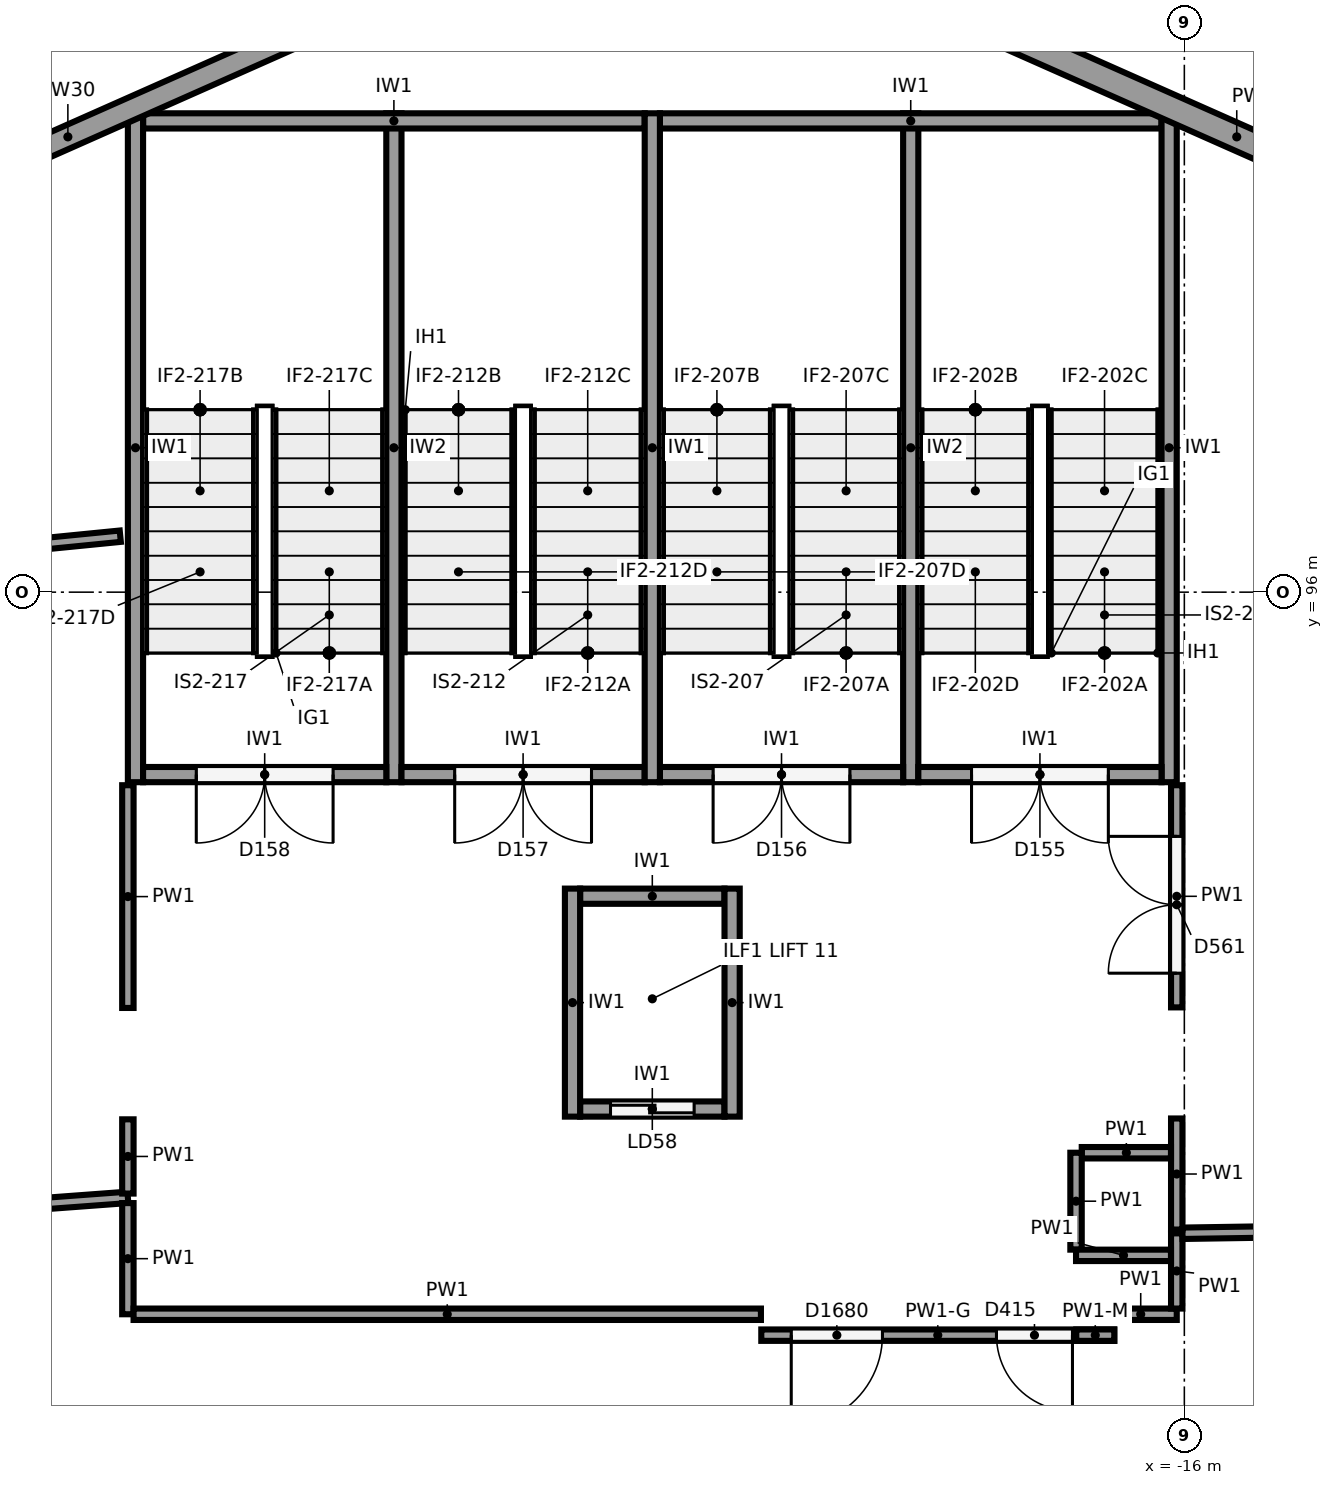
"""IFC4 building model, lengths in metres.
Left out: names, types, materials, properties, quantities, classifications, styles, units other than length and angle.
Written with IfcOpenShell. Run it as: python <this file> out.ifc"""

import sys

from ifc_helpers import new_model, si_unit, direction, frame, frame_2d, origin, origin_2d, place, context, subcontext, project, spatial, rectangle, circle, extrude, element, fill, save


model = new_model("IFC4")
c1 = context("Model", 3, precision=1e-05, world=origin(), true_north=direction((0.0, 1.0)))
c2 = subcontext(c1, "Body", "Model", "MODEL_VIEW")
j1 = project(units=[si_unit("LENGTHUNIT", "METRE"), si_unit("PLANEANGLEUNIT", "RADIAN")], contexts=[c1])
p1 = place(None, origin())
s1 = spatial("IfcSite", under=j1, at=p1, CompositionType="ELEMENT")
p2 = place(p1, origin())
s2 = spatial("IfcBuilding", under=s1, at=p2, CompositionType="ELEMENT")
p3 = place(p2, origin())
s3 = spatial("IfcBuildingStorey", under=s2, at=p3, CompositionType="ELEMENT", Elevation=0.0)
p4 = place(p3, frame((-19.119, 85.698, 0.0), z_axis=(0.0, 0.0, 1.0), x_axis=(1.0, 0.0, 0.0)))
e1 = element("IfcColumn", 1, at=p4, inside=s3, PredefinedType="COLUMN", context=c2, shape_type="SweptSolid", body=[
    extrude(circle(Radius=0.4, at=origin_2d()), origin(), (0.0, 0.0, 1.0), 6.5),
])
p5 = place(p3, frame((-19.627, 89.904, 0.0), z_axis=(0.0, 0.0, 1.0), x_axis=(1.0, 0.0, 0.0)))
e2 = element("IfcColumn", 2, at=p5, inside=s3, PredefinedType="COLUMN", context=c2, shape_type="SweptSolid", body=[
    extrude(circle(Radius=0.55, at=origin_2d()), origin(), (0.0, 0.0, 1.0), 6.5),
])
p6 = place(p3, frame((-22.543, 105.198, 0.0), z_axis=(0.0, 0.0, 1.0), x_axis=(0.914138897099, -0.405401130748, 0.0)))
e3 = element("IfcWall", 3, at=p6, inside=s3, PredefinedType="SOLIDWALL", context=c2, shape_type="SweptSolid", body=[
    extrude(rectangle(XDim=15.824, YDim=0.35, at=frame_2d((7.912, 0.0))), origin(), (0.0, 0.0, 1.0), 4.85),
])
p7 = place(p3, frame((-37.922, 98.782, 0.0), z_axis=(0.0, 0.0, 1.0), x_axis=(0.914138897099, 0.405401130748, 0.0)))
e4 = element("IfcWall", 4, at=p7, inside=s3, PredefinedType="SOLIDWALL", context=c2, shape_type="SweptSolid", body=[
    extrude(rectangle(XDim=15.824, YDim=0.3, at=frame_2d((7.912, 0.0))), origin(), (0.0, 0.0, 1.0), 4.85),
])
for number, where, z_axis, x_axis in (
    (5, (-16.2, 102.3, 0.0), (0.0, 0.0, 1.0), (0.0, -1.0, 0.0)),
    (6, (-23.0, 102.3, 0.0), (0.0, 0.0, 1.0), (0.0, -1.0, 0.0)),
    (7, (-29.8, 102.3, 0.0), (0.0, 0.0, 1.0), (0.0, -1.0, 0.0)),
):
    element("IfcWall", number, at=place(p3, frame(where, z_axis=z_axis, x_axis=x_axis)), inside=s3, PredefinedType="SHEAR", context=c2, shape_type="SweptSolid", body=[
        extrude(rectangle(XDim=8.8, YDim=0.2, at=frame_2d((4.4, 0.0))), origin(), (0.0, 0.0, 1.0), 6.15),
    ])
for number, where, z_axis, x_axis in (
    (8, (-16.3, 102.2, 0.0), (0.0, 0.0, 1.0), (-1.0, 0.0, 0.0)),
    (9, (-23.1, 102.2, 0.0), (0.0, 0.0, 1.0), (-1.0, 0.0, 0.0)),
):
    element("IfcWall", number, at=place(p3, frame(where, z_axis=z_axis, x_axis=x_axis)), inside=s3, PredefinedType="SHEAR", context=c2, shape_type="SweptSolid", body=[
        extrude(rectangle(XDim=6.6, YDim=0.2, at=frame_2d((3.3, 0.0))), origin(), (0.0, 0.0, 1.0), 6.15),
    ])
for number, where, z_axis, x_axis in (
    (10, (-19.6, 102.3, 0.0), (0.0, 0.0, 1.0), (0.0, -1.0, 0.0)),
    (11, (-26.4, 102.3, 0.0), (0.0, 0.0, 1.0), (0.0, -1.0, 0.0)),
):
    element("IfcWall", number, at=place(p3, frame(where, z_axis=z_axis, x_axis=x_axis)), inside=s3, PredefinedType="SHEAR", context=c2, shape_type="SweptSolid", body=[
        extrude(rectangle(XDim=8.8, YDim=0.2, at=frame_2d((4.4, 0.0))), origin(), (0.0, 0.0, 1.0), 6.15),
    ])
p8 = place(p3, frame((-16.3, 93.6, 0.0), z_axis=(0.0, 0.0, 1.0), x_axis=(-1.0, 0.0, 0.0)))
e12 = element("IfcWall", 12, at=p8, inside=s3, PredefinedType="SHEAR", context=c2, shape_type="SweptSolid", body=[
    extrude(rectangle(XDim=3.2, YDim=0.2, at=frame_2d((1.6, 0.0))), origin(), (0.0, 0.0, 1.0), 6.15),
])
p9 = place(p8, frame((0.7, 0.0, 0.0)))
e13 = element("IfcOpeningElement", 13, at=p9, cuts=e12, PredefinedType="OPENING", context=c2, shape_type="SweptSolid", body=[
    extrude(rectangle(XDim=1.8, YDim=2.1, at=frame_2d((0.9, 1.05))), frame((0.0, 0.11, 0.0), z_axis=(0.0, -1.0, 0.0), x_axis=(1.0, 0.0, 0.0)), (0.0, 0.0, 1.0), 0.22),
])
p10 = place(p3, frame((-19.7, 93.6, 0.0), z_axis=(0.0, 0.0, 1.0), x_axis=(-1.0, 0.0, 0.0)))
e14 = element("IfcWall", 14, at=p10, inside=s3, PredefinedType="SHEAR", context=c2, shape_type="SweptSolid", body=[
    extrude(rectangle(XDim=3.2, YDim=0.2, at=frame_2d((1.6, 0.0))), origin(), (0.0, 0.0, 1.0), 6.15),
])
p11 = place(p10, frame((0.7, 0.0, 0.0)))
e15 = element("IfcOpeningElement", 15, at=p11, cuts=e14, PredefinedType="OPENING", context=c2, shape_type="SweptSolid", body=[
    extrude(rectangle(XDim=1.8, YDim=2.1, at=frame_2d((0.9, 1.05))), frame((0.0, 0.11, 0.0), z_axis=(0.0, -1.0, 0.0), x_axis=(1.0, 0.0, 0.0)), (0.0, 0.0, 1.0), 0.22),
])
p12 = place(p3, frame((-23.1, 93.6, 0.0), z_axis=(0.0, 0.0, 1.0), x_axis=(-1.0, 0.0, 0.0)))
e16 = element("IfcWall", 16, at=p12, inside=s3, PredefinedType="SHEAR", context=c2, shape_type="SweptSolid", body=[
    extrude(rectangle(XDim=3.2, YDim=0.2, at=frame_2d((1.6, 0.0))), origin(), (0.0, 0.0, 1.0), 6.15),
])
p13 = place(p12, frame((0.7, 0.0, 0.0)))
e17 = element("IfcOpeningElement", 17, at=p13, cuts=e16, PredefinedType="OPENING", context=c2, shape_type="SweptSolid", body=[
    extrude(rectangle(XDim=1.8, YDim=2.1, at=frame_2d((0.9, 1.05))), frame((0.0, 0.11, 0.0), z_axis=(0.0, -1.0, 0.0), x_axis=(1.0, 0.0, 0.0)), (0.0, 0.0, 1.0), 0.22),
])
p14 = place(p3, frame((-26.5, 93.6, 0.0), z_axis=(0.0, 0.0, 1.0), x_axis=(-1.0, 0.0, 0.0)))
e18 = element("IfcWall", 18, at=p14, inside=s3, PredefinedType="SHEAR", context=c2, shape_type="SweptSolid", body=[
    extrude(rectangle(XDim=3.2, YDim=0.2, at=frame_2d((1.6, 0.0))), origin(), (0.0, 0.0, 1.0), 6.15),
])
p15 = place(p14, frame((0.7, 0.0, 0.0)))
e19 = element("IfcOpeningElement", 19, at=p15, cuts=e18, PredefinedType="OPENING", context=c2, shape_type="SweptSolid", body=[
    extrude(rectangle(XDim=1.8, YDim=2.1, at=frame_2d((0.9, 1.05))), frame((0.0, 0.11, 0.0), z_axis=(0.0, -1.0, 0.0), x_axis=(1.0, 0.0, 0.0)), (0.0, 0.0, 1.0), 0.22),
])
for number, where, z_axis, x_axis in (
    (20, (-21.95, 92.1, 0.0), (0.0, 0.0, 1.0), (0.0, -1.0, 0.0)),
    (21, (-24.05, 92.1, 0.0), (0.0, 0.0, 1.0), (0.0, -1.0, 0.0)),
):
    element("IfcWall", number, at=place(p3, frame(where, z_axis=z_axis, x_axis=x_axis)), inside=s3, PredefinedType="SHEAR", context=c2, shape_type="SweptSolid", body=[
        extrude(rectangle(XDim=3.0, YDim=0.2, at=frame_2d((1.5, 0.0))), origin(), (0.0, 0.0, 1.0), 6.15),
    ])
p16 = place(p3, frame((-22.05, 92.0, 0.0), z_axis=(0.0, 0.0, 1.0), x_axis=(-1.0, 0.0, 0.0)))
e22 = element("IfcWall", 22, at=p16, inside=s3, PredefinedType="SHEAR", context=c2, shape_type="SweptSolid", body=[
    extrude(rectangle(XDim=1.9, YDim=0.2, at=frame_2d((0.95, 0.0))), origin(), (0.0, 0.0, 1.0), 6.15),
])
p17 = place(p3, frame((-22.05, 89.2, 0.0), z_axis=(0.0, 0.0, 1.0), x_axis=(-1.0, 0.0, 0.0)))
e23 = element("IfcWall", 23, at=p17, inside=s3, PredefinedType="SHEAR", context=c2, shape_type="SweptSolid", body=[
    extrude(rectangle(XDim=1.9, YDim=0.2, at=frame_2d((0.95, 0.0))), origin(), (0.0, 0.0, 1.0), 6.15),
])
p18 = place(p17, frame((0.4, 0.0, 0.0)))
e24 = element("IfcOpeningElement", 24, at=p18, cuts=e23, PredefinedType="OPENING", context=c2, shape_type="SweptSolid", body=[
    extrude(rectangle(XDim=1.1, YDim=2.1, at=frame_2d((0.55, 1.05))), frame((0.0, 0.11, 0.0), z_axis=(0.0, -1.0, 0.0), x_axis=(1.0, 0.0, 0.0)), (0.0, 0.0, 1.0), 0.22),
])
p19 = place(p3, frame((-17.048, 86.5, 0.0), z_axis=(0.0, 0.0, 1.0), x_axis=(1.0, 0.0, 0.0)))
e25 = element("IfcWall", 25, at=p19, inside=s3, PredefinedType="PARTITIONING", context=c2, shape_type="SweptSolid", body=[
    extrude(rectangle(XDim=0.948, YDim=0.15, at=frame_2d((0.474, 0.0))), origin(), (0.0, 0.0, 1.0), 6.15),
])
p20 = place(p3, frame((-16.1, 86.575, 0.0), z_axis=(0.0, 0.0, 1.0), x_axis=(0.0, 1.0, 0.0)))
e26 = element("IfcWall", 26, at=p20, inside=s3, PredefinedType="PARTITIONING", context=c2, shape_type="SweptSolid", body=[
    extrude(rectangle(XDim=0.989, YDim=0.15, at=frame_2d((0.495, 0.0))), origin(), (0.0, 0.0, 1.0), 6.15),
])
p21 = place(p3, frame((-16.025, 87.565, 0.0), z_axis=(0.0, 0.0, 1.0), x_axis=(0.999882927084, 0.015301376583, 0.0)))
e27 = element("IfcWall", 27, at=p21, inside=s3, PredefinedType="PARTITIONING", context=c2, shape_type="SweptSolid", body=[
    extrude(rectangle(XDim=8.855, YDim=0.15, at=frame_2d((4.428, 0.0))), origin(), (0.0, 0.0, 1.0), 6.15),
])
p22 = place(p3, frame((-16.1, 87.614, 0.0), z_axis=(0.0, 0.0, 1.0), x_axis=(0.0, 1.0, 0.0)))
e28 = element("IfcWall", 28, at=p22, inside=s3, PredefinedType="PARTITIONING", context=c2, shape_type="SweptSolid", body=[
    extrude(rectangle(XDim=1.461, YDim=0.15, at=frame_2d((0.731, 0.0))), origin(), (0.0, 0.0, 1.0), 6.15),
])
p23 = place(p3, frame((-16.1, 90.537, 0.0), z_axis=(0.0, 0.0, 1.0), x_axis=(0.0, 1.0, 0.0)))
e29 = element("IfcWall", 29, at=p23, inside=s3, PredefinedType="PARTITIONING", context=c2, shape_type="SweptSolid", body=[
    extrude(rectangle(XDim=2.923, YDim=0.15, at=frame_2d((1.461, 0.0))), origin(), (0.0, 0.0, 1.0), 6.15),
])
p24 = place(p23, frame((0.45, 0.0, 0.0)))
e30 = element("IfcOpeningElement", 30, at=p24, cuts=e29, PredefinedType="OPENING", context=c2, shape_type="SweptSolid", body=[
    extrude(rectangle(XDim=1.8, YDim=2.1, at=frame_2d((0.9, 1.05))), frame((0.0, 0.085, 0.0), z_axis=(0.0, -1.0, 0.0), x_axis=(1.0, 0.0, 0.0)), (0.0, 0.0, 1.0), 0.17),
])
p25 = place(p3, frame((-32.71, 87.83, 0.0), z_axis=(0.0, 0.0, 1.0), x_axis=(0.997265626559, 0.07390040652, 0.0)))
e31 = element("IfcWall", 31, at=p25, inside=s3, PredefinedType="PARTITIONING", context=c2, shape_type="SweptSolid", body=[
    extrude(rectangle(XDim=2.818, YDim=0.15, at=frame_2d((1.409, 0.0))), origin(), (0.0, 0.0, 1.0), 6.15),
])
p26 = place(p3, frame((-29.9, 87.963, 0.0), z_axis=(0.0, 0.0, 1.0), x_axis=(0.0, -1.0, 0.0)))
e32 = element("IfcWall", 32, at=p26, inside=s3, PredefinedType="PARTITIONING", context=c2, shape_type="SweptSolid", body=[
    extrude(rectangle(XDim=1.463, YDim=0.15, at=frame_2d((0.731, 0.0))), origin(), (0.0, 0.0, 1.0), 6.15),
])
p27 = place(p3, frame((-29.825, 86.5, 0.0), z_axis=(0.0, 0.0, 1.0), x_axis=(1.0, 0.0, 0.0)))
e33 = element("IfcWall", 33, at=p27, inside=s3, PredefinedType="PARTITIONING", context=c2, shape_type="SweptSolid", body=[
    extrude(rectangle(XDim=8.254, YDim=0.15, at=frame_2d((4.127, 0.0))), origin(), (0.0, 0.0, 1.0), 6.15),
])
p28 = place(p3, frame((-36.009, 96.141, 0.0), z_axis=(0.0, 0.0, 1.0), x_axis=(0.995133204742, 0.098538849293, 0.0)))
e34 = element("IfcWall", 34, at=p28, inside=s3, PredefinedType="PARTITIONING", context=c2, shape_type="SweptSolid", body=[
    extrude(rectangle(XDim=6.038, YDim=0.15, at=frame_2d((3.019, 0.0))), origin(), (0.0, 0.0, 1.0), 6.15),
])
p29 = place(p3, frame((-29.9, 93.46, 0.0), z_axis=(0.0, 0.0, 1.0), x_axis=(0.0, -1.0, 0.0)))
e35 = element("IfcWall", 35, at=p29, inside=s3, PredefinedType="PARTITIONING", context=c2, shape_type="SweptSolid", body=[
    extrude(rectangle(XDim=2.93, YDim=0.15, at=frame_2d((1.465, 0.0))), origin(), (0.0, 0.0, 1.0), 6.15),
])
p30 = place(p3, frame((-29.9, 89.064, 0.0), z_axis=(0.0, 0.0, 1.0), x_axis=(0.0, -1.0, 0.0)))
e36 = element("IfcWall", 36, at=p30, inside=s3, PredefinedType="PARTITIONING", context=c2, shape_type="SweptSolid", body=[
    extrude(rectangle(XDim=0.977, YDim=0.15, at=frame_2d((0.488, 0.0))), origin(), (0.0, 0.0, 1.0), 6.15),
])
p31 = place(p3, frame((-24.556, 108.211, 0.0), z_axis=(0.0, 0.0, 1.0), x_axis=(-0.914131290895, -0.40541828154, 0.0)))
e37 = element("IfcWall", 37, at=p31, inside=s3, PredefinedType="PARTITIONING", context=c2, shape_type="SweptSolid", body=[
    extrude(rectangle(XDim=13.087, YDim=0.15, at=frame_2d((6.543, 0.0))), origin(), (0.0, 0.0, 1.0), 4.85),
])
p32 = place(p3, frame((-16.176, 88.625, 0.0), z_axis=(0.0, 0.0, 1.0), x_axis=(-1.0, 0.0, 0.0)))
e38 = element("IfcWall", 38, at=p32, inside=s3, PredefinedType="PARTITIONING", context=c2, shape_type="SweptSolid", body=[
    extrude(rectangle(XDim=1.174, YDim=0.15, at=frame_2d((0.587, 0.0))), origin(), (0.0, 0.0, 1.0), 6.15),
])
p33 = place(p3, frame((-17.425, 88.625, 0.0), z_axis=(0.0, 0.0, 1.0), x_axis=(0.0, -1.0, 0.0)))
e39 = element("IfcWall", 39, at=p33, inside=s3, PredefinedType="PARTITIONING", context=c2, shape_type="SweptSolid", body=[
    extrude(rectangle(XDim=1.275, YDim=0.15, at=frame_2d((0.637, 0.0))), origin(), (0.0, 0.0, 1.0), 6.15),
])
p34 = place(p3, frame((-17.425, 87.275, 0.0), z_axis=(0.0, 0.0, 1.0), x_axis=(1.0, 0.0, 0.0)))
e40 = element("IfcWall", 40, at=p34, inside=s3, PredefinedType="PARTITIONING", context=c2, shape_type="SweptSolid", body=[
    extrude(rectangle(XDim=1.249, YDim=0.15, at=frame_2d((0.625, 0.0))), origin(), (0.0, 0.0, 1.0), 6.15),
])
p35 = place(p3, frame((-16.922, 86.225, 0.0), z_axis=(0.0, 0.0, 1.0), x_axis=(-1.0, 0.0, 0.0)))
e41 = element("IfcWall", 41, at=p35, inside=s3, PredefinedType="PARTITIONING", context=c2, shape_type="SweptSolid", body=[
    extrude(rectangle(XDim=4.644, YDim=0.15, at=frame_2d((2.322, 0.0))), origin(), (0.0, 0.0, 1.0), 5.4),
])
p36 = place(p35, frame((0.55, 0.0, 0.0)))
e42 = element("IfcOpeningElement", 42, at=p36, cuts=e41, PredefinedType="OPENING", context=c2, shape_type="SweptSolid", body=[
    extrude(rectangle(XDim=1.0, YDim=2.1, at=frame_2d((0.5, 1.05))), frame((0.0, 0.085, 0.0), z_axis=(0.0, -1.0, 0.0), x_axis=(1.0, 0.0, 0.0)), (0.0, 0.0, 1.0), 0.17),
])
p37 = place(p35, frame((3.05, 0.0, 0.0)))
e43 = element("IfcOpeningElement", 43, at=p37, cuts=e41, PredefinedType="OPENING", context=c2, shape_type="SweptSolid", body=[
    extrude(rectangle(XDim=1.2, YDim=2.1, at=frame_2d((0.6, 1.05))), frame((0.0, 0.085, 0.0), z_axis=(0.0, -1.0, 0.0), x_axis=(1.0, 0.0, 0.0)), (0.0, 0.0, 1.0), 0.17),
])
p38 = place(p3, frame((-16.922, 86.225, 5.4), z_axis=(0.0, 0.0, 1.0), x_axis=(-1.0, 0.0, 0.0)))
e44 = element("IfcWall", 44, at=p38, inside=s3, PredefinedType="PARTITIONING", context=c2, shape_type="SweptSolid", body=[
    extrude(rectangle(XDim=0.5, YDim=0.15, at=frame_2d((0.25, 0.0))), origin(), (0.0, 0.0, 1.0), 0.75),
])
p39 = place(p9, origin())
e45 = element("IfcDoor", 45, at=p39, inside=s3, OperationType="DOUBLE_DOOR_SINGLE_SWING", PredefinedType="DOOR", context=c2, shape_type="SweptSolid", body=[
    extrude(rectangle(XDim=1.8, YDim=2.1, at=frame_2d((0.9, 1.05))), frame((0.0, 0.025, 0.0), z_axis=(0.0, -1.0, 0.0), x_axis=(1.0, 0.0, 0.0)), (0.0, 0.0, 1.0), 0.05),
])
fill(e13, e45)
p40 = place(p11, origin())
e46 = element("IfcDoor", 46, at=p40, inside=s3, OperationType="DOUBLE_DOOR_SINGLE_SWING", PredefinedType="DOOR", context=c2, shape_type="SweptSolid", body=[
    extrude(rectangle(XDim=1.8, YDim=2.1, at=frame_2d((0.9, 1.05))), frame((0.0, 0.025, 0.0), z_axis=(0.0, -1.0, 0.0), x_axis=(1.0, 0.0, 0.0)), (0.0, 0.0, 1.0), 0.05),
])
fill(e15, e46)
p41 = place(p13, origin())
e47 = element("IfcDoor", 47, at=p41, inside=s3, OperationType="DOUBLE_DOOR_SINGLE_SWING", PredefinedType="DOOR", context=c2, shape_type="SweptSolid", body=[
    extrude(rectangle(XDim=1.8, YDim=2.1, at=frame_2d((0.9, 1.05))), frame((0.0, 0.025, 0.0), z_axis=(0.0, -1.0, 0.0), x_axis=(1.0, 0.0, 0.0)), (0.0, 0.0, 1.0), 0.05),
])
fill(e17, e47)
p42 = place(p15, origin())
e48 = element("IfcDoor", 48, at=p42, inside=s3, OperationType="DOUBLE_DOOR_SINGLE_SWING", PredefinedType="DOOR", context=c2, shape_type="SweptSolid", body=[
    extrude(rectangle(XDim=1.8, YDim=2.1, at=frame_2d((0.9, 1.05))), frame((0.0, 0.025, 0.0), z_axis=(0.0, -1.0, 0.0), x_axis=(1.0, 0.0, 0.0)), (0.0, 0.0, 1.0), 0.05),
])
fill(e19, e48)
p43 = place(p18, origin())
e49 = element("IfcDoor", 49, at=p43, inside=s3, OperationType="SLIDING_TO_RIGHT", PredefinedType="DOOR", context=c2, shape_type="SweptSolid", body=[
    extrude(rectangle(XDim=1.1, YDim=2.1, at=frame_2d((0.55, 1.05))), frame((0.0, 0.025, 0.0), z_axis=(0.0, -1.0, 0.0), x_axis=(1.0, 0.0, 0.0)), (0.0, 0.0, 1.0), 0.05),
])
fill(e24, e49)
p44 = place(p24, origin())
e50 = element("IfcDoor", 50, at=p44, inside=s3, OperationType="DOUBLE_DOOR_SINGLE_SWING", PredefinedType="DOOR", context=c2, shape_type="SweptSolid", body=[
    extrude(rectangle(XDim=1.8, YDim=2.1, at=frame_2d((0.9, 1.05))), frame((0.0, 0.025, 0.0), z_axis=(0.0, -1.0, 0.0), x_axis=(1.0, 0.0, 0.0)), (0.0, 0.0, 1.0), 0.05),
])
fill(e30, e50)
p45 = place(p36, origin())
e51 = element("IfcDoor", 51, at=p45, inside=s3, OperationType="SINGLE_SWING_LEFT", PredefinedType="DOOR", context=c2, shape_type="SweptSolid", body=[
    extrude(rectangle(XDim=1.0, YDim=2.1, at=frame_2d((0.5, 1.05))), frame((0.0, 0.025, 0.0), z_axis=(0.0, -1.0, 0.0), x_axis=(1.0, 0.0, 0.0)), (0.0, 0.0, 1.0), 0.05),
])
fill(e42, e51)
p46 = place(p37, origin())
e52 = element("IfcDoor", 52, at=p46, inside=s3, OperationType="SINGLE_SWING_RIGHT", PredefinedType="DOOR", context=c2, shape_type="SweptSolid", body=[
    extrude(rectangle(XDim=1.2, YDim=2.1, at=frame_2d((0.6, 1.05))), frame((0.0, 0.025, 0.0), z_axis=(0.0, -1.0, 0.0), x_axis=(1.0, 0.0, 0.0)), (0.0, 0.0, 1.0), 0.05),
])
fill(e43, e52)
save(model, sys.argv[1])
